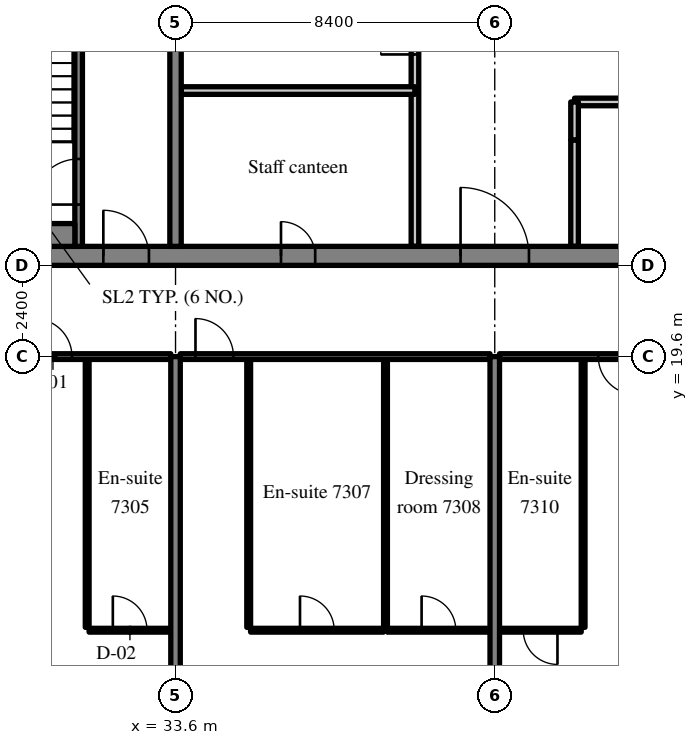
"""IFC4 building model, lengths in metres.
Left out: names, types, materials, properties, quantities, classifications, styles, units other than length and angle.
Written with IfcOpenShell. Run it as: python <this file> out.ifc"""

import sys

from ifc_helpers import new_model, si_unit, direction, frame, frame_2d, origin, place, context, subcontext, project, spatial, rectangle, extrude, source, transform, mapped, element, fill, save


model = new_model("IFC4")
c1 = context("Model", 3, precision=1e-05, world=origin(), true_north=direction((0.0, 1.0)))
c2 = subcontext(c1, "Body", "Model", "MODEL_VIEW")
j1 = project(units=[si_unit("LENGTHUNIT", "METRE"), si_unit("PLANEANGLEUNIT", "RADIAN")], contexts=[c1])
p1 = place(None, origin())
s1 = spatial("IfcSite", under=j1, at=p1, CompositionType="ELEMENT")
p2 = place(p1, origin())
s2 = spatial("IfcBuilding", under=s1, at=p2, CompositionType="ELEMENT")
p3 = place(p2, frame((0.0, 0.0, 305.7)))
s3 = spatial("IfcBuildingStorey", under=s2, at=p3, CompositionType="ELEMENT", Elevation=305.7)
m1 = source(origin(), c2, "Body", "SweptSolid", [
    extrude(rectangle(XDim=50.4, YDim=0.5, at=frame_2d((25.2, 0.0))), origin(), (0.0, 0.0, 1.0), 3.72),
])
p4 = place(p3, frame((25.2, 22.25, 0.0), z_axis=(0.0, 0.0, 1.0), x_axis=(1.0, 0.0, 0.0)))
e1 = element("IfcWall", 1, at=p4, inside=s3, PredefinedType="SHEAR", context=c2, shape_type="MappedRepresentation", body=[
    mapped(m1, transform((0.0, 0.0, 0.0), scale=1.0)),
])
m2 = source(origin(), c2, "Body", "SweptSolid", [
    extrude(rectangle(XDim=1.8, YDim=2.1, at=frame_2d((0.9, 1.05))), frame((0.0, 0.26, 0.0), z_axis=(0.0, -1.0, 0.0), x_axis=(1.0, 0.0, 0.0)), (0.0, 0.0, 1.0), 0.52),
])
p5 = place(p4, frame((15.9, 0.0, 0.0)))
e2 = element("IfcOpeningElement", 2, at=p5, cuts=e1, PredefinedType="OPENING", context=c2, shape_type="MappedRepresentation", body=[
    mapped(m2, transform((0.0, 0.0, 0.0), scale=1.0)),
])
m3 = source(origin(), c2, "Body", "SweptSolid", [
    extrude(rectangle(XDim=0.9, YDim=2.1, at=frame_2d((0.45, 1.05))), frame((0.0, 0.26, 0.0), z_axis=(0.0, -1.0, 0.0), x_axis=(1.0, 0.0, 0.0)), (0.0, 0.0, 1.0), 0.52),
])
p6 = place(p4, frame((11.175, 0.0, 0.0)))
e3 = element("IfcOpeningElement", 3, at=p6, cuts=e1, PredefinedType="OPENING", context=c2, shape_type="MappedRepresentation", body=[
    mapped(m3, transform((0.0, 0.0, 0.0), scale=1.0)),
])
p7 = place(p4, frame((21.525, 0.0, 0.0)))
e4 = element("IfcOpeningElement", 4, at=p7, cuts=e1, PredefinedType="OPENING", context=c2, shape_type="MappedRepresentation", body=[
    mapped(m3, transform((0.0, 0.0, 0.0), scale=1.0)),
])
p8 = place(p4, frame((32.7, 0.0, 0.0)))
e5 = element("IfcOpeningElement", 5, at=p8, cuts=e1, PredefinedType="OPENING", context=c2, shape_type="MappedRepresentation", body=[
    mapped(m2, transform((0.0, 0.0, 0.0), scale=1.0)),
])
m4 = source(origin(), c2, "Body", "SweptSolid", [
    extrude(rectangle(XDim=1.2, YDim=2.1, at=frame_2d((0.6, 1.05))), frame((0.0, 0.26, 0.0), z_axis=(0.0, -1.0, 0.0), x_axis=(1.0, 0.0, 0.0)), (0.0, 0.0, 1.0), 0.52),
])
p9 = place(p4, frame((6.5, 0.0, 0.0)))
e6 = element("IfcOpeningElement", 6, at=p9, cuts=e1, PredefinedType="OPENING", context=c2, shape_type="MappedRepresentation", body=[
    mapped(m4, transform((0.0, 0.0, 0.0), scale=1.0)),
])
p10 = place(p4, frame((47.975, 0.0, 0.0)))
e7 = element("IfcOpeningElement", 7, at=p10, cuts=e1, PredefinedType="OPENING", context=c2, shape_type="MappedRepresentation", body=[
    mapped(m4, transform((0.0, 0.0, 0.0), scale=1.0)),
])
m5 = source(origin(), c2, "Body", "SweptSolid", [
    extrude(rectangle(XDim=19.0, YDim=0.3, at=frame_2d((9.5, 0.0))), origin(), (0.0, 0.0, 1.0), 3.72),
])
p11 = place(p3, frame((33.6, 22.5, 0.0), z_axis=(0.0, 0.0, 1.0), x_axis=(0.0, 1.0, 0.0)))
e8 = element("IfcWall", 8, at=p11, inside=s3, PredefinedType="SHEAR", context=c2, shape_type="MappedRepresentation", body=[
    mapped(m5, transform((0.0, 0.0, 0.0), scale=1.0)),
])
m6 = source(origin(), c2, "Body", "SweptSolid", [
    extrude(rectangle(XDim=1.1, YDim=2.1, at=frame_2d((0.55, 1.05))), frame((0.0, 0.16, 0.0), z_axis=(0.0, -1.0, 0.0), x_axis=(1.0, 0.0, 0.0)), (0.0, 0.0, 1.0), 0.32),
])
p12 = place(p11, frame((12.95, 0.0, 0.0)))
e9 = element("IfcOpeningElement", 9, at=p12, cuts=e8, PredefinedType="OPENING", context=c2, shape_type="MappedRepresentation", body=[
    mapped(m6, transform((0.0, 0.0, 0.0), scale=1.0)),
])
m7 = source(origin(), c2, "Body", "SweptSolid", [
    extrude(rectangle(XDim=14.1, YDim=0.25, at=frame_2d((7.05, 0.0))), origin(), (0.0, 0.0, 1.0), 3.72),
])
for number, where, z_axis, x_axis in (
    (10, (33.6, 5.5, 0.0), (0.0, 0.0, 1.0), (0.0, 1.0, 0.0)),
    (11, (42.0, 5.5, 0.0), (0.0, 0.0, 1.0), (0.0, 1.0, 0.0)),
):
    element("IfcWall", number, at=place(p3, frame(where, z_axis=z_axis, x_axis=x_axis)), inside=s3, PredefinedType="SHEAR", context=c2, shape_type="MappedRepresentation", body=[
        mapped(m7, transform((0.0, 0.0, 0.0), scale=1.0)),
    ])
m8 = source(origin(), c2, "Body", "SweptSolid", [
    extrude(rectangle(XDim=8.95, YDim=0.2, at=frame_2d((4.475, 0.0))), origin(), (0.0, 0.0, 1.0), 3.72),
])
p13 = place(p3, frame((39.9, 22.5, 0.0), z_axis=(0.0, 0.0, 1.0), x_axis=(0.0, 1.0, 0.0)))
e12 = element("IfcWall", 12, at=p13, inside=s3, PredefinedType="PARTITIONING", context=c2, shape_type="MappedRepresentation", body=[
    mapped(m8, transform((0.0, 0.0, 0.0), scale=1.0)),
])
m9 = source(origin(), c2, "Body", "SweptSolid", [
    extrude(rectangle(XDim=0.9, YDim=2.1, at=frame_2d((0.45, 1.05))), frame((0.0, 0.11, 0.0), z_axis=(0.0, -1.0, 0.0), x_axis=(1.0, 0.0, 0.0)), (0.0, 0.0, 1.0), 0.22),
])
p14 = place(p13, frame((5.05, 0.0, 0.0)))
e13 = element("IfcOpeningElement", 13, at=p14, cuts=e12, PredefinedType="OPENING", context=c2, shape_type="MappedRepresentation", body=[
    mapped(m9, transform((0.0, 0.0, 0.0), scale=1.0)),
])
m10 = source(origin(), c2, "Body", "SweptSolid", [
    extrude(rectangle(XDim=2.8, YDim=0.2, at=frame_2d((1.4, 0.0))), origin(), (0.0, 0.0, 1.0), 3.72),
])
p15 = place(p3, frame((44.1, 22.5, 0.0), z_axis=(0.0, 0.0, 1.0), x_axis=(0.0, 1.0, 0.0)))
e14 = element("IfcWall", 14, at=p15, inside=s3, PredefinedType="PARTITIONING", context=c2, shape_type="MappedRepresentation", body=[
    mapped(m10, transform((0.0, 0.0, 0.0), scale=1.0)),
])
m11 = source(origin(), c2, "Body", "SweptSolid", [
    extrude(rectangle(XDim=6.15, YDim=0.2, at=frame_2d((3.075, 0.0))), origin(), (0.0, 0.0, 1.0), 3.72),
])
for number, where, z_axis, x_axis in (
    (15, (33.75, 26.6, 0.0), (0.0, 0.0, 1.0), (1.0, 0.0, 0.0)),
    (16, (44.1, 26.3, 0.0), (0.0, 0.0, 1.0), (1.0, 0.0, 0.0)),
):
    element("IfcWall", number, at=place(p3, frame(where, z_axis=z_axis, x_axis=x_axis)), inside=s3, PredefinedType="PARTITIONING", context=c2, shape_type="MappedRepresentation", body=[
        mapped(m11, transform((0.0, 0.0, 0.0), scale=1.0)),
    ])
m12 = source(origin(), c2, "Body", "SweptSolid", [
    extrude(rectangle(XDim=1.0, YDim=0.2, at=frame_2d((0.5, 0.0))), origin(), (0.0, 0.0, 1.0), 3.72),
])
p16 = place(p3, frame((44.1, 25.3, 0.0), z_axis=(0.0, 0.0, 1.0), x_axis=(0.0, 1.0, 0.0)))
e17 = element("IfcWall", 17, at=p16, inside=s3, PredefinedType="PARTITIONING", context=c2, shape_type="MappedRepresentation", body=[
    mapped(m12, transform((0.0, 0.0, 0.0), scale=1.0)),
])
m13 = source(origin(), c2, "Body", "SweptSolid", [
    extrude(rectangle(XDim=8.95, YDim=0.2, at=frame_2d((4.475, 0.0))), origin(), (0.0, 0.0, 1.0), 3.72),
])
p17 = place(p3, frame((31.05, 22.5, 0.0), z_axis=(0.0, 0.0, 1.0), x_axis=(0.0, 1.0, 0.0)))
e18 = element("IfcWall", 18, at=p17, inside=s3, PredefinedType="SOLIDWALL", context=c2, shape_type="MappedRepresentation", body=[
    mapped(m13, transform((0.0, 0.0, 0.0), scale=1.0)),
])
m14 = source(origin(), c2, "Body", "SweptSolid", [
    extrude(rectangle(XDim=1.2, YDim=2.1, at=frame_2d((0.6, 1.05))), frame((0.0, 0.11, 0.0), z_axis=(0.0, -1.0, 0.0), x_axis=(1.0, 0.0, 0.0)), (0.0, 0.0, 1.0), 0.22),
])
p18 = place(p17, frame((1.1, 0.0, 0.0)))
e19 = element("IfcOpeningElement", 19, at=p18, cuts=e18, PredefinedType="OPENING", context=c2, shape_type="MappedRepresentation", body=[
    mapped(m14, transform((0.0, 0.0, 0.0), scale=1.0)),
])
m15 = source(origin(), c2, "Body", "SweptSolid", [
    extrude(rectangle(XDim=5.25, YDim=0.6, at=frame_2d((2.625, 0.0))), origin(), (0.0, 0.0, 1.0), 3.72),
])
p19 = place(p3, frame((25.7, 22.8, 0.0), z_axis=(0.0, 0.0, 1.0), x_axis=(1.0, 0.0, 0.0)))
e20 = element("IfcWall", 20, at=p19, inside=s3, PredefinedType="SOLIDWALL", context=c2, shape_type="MappedRepresentation", body=[
    mapped(m15, transform((0.0, 0.0, 0.0), scale=1.0)),
])
m16 = source(origin(), c2, "Body", "SweptSolid", [
    extrude(rectangle(XDim=7.05, YDim=0.1, at=frame_2d((3.525, 0.0))), origin(), (0.0, 0.0, 1.0), 3.72),
])
p20 = place(p3, frame((31.275, 12.475, 0.0), z_axis=(0.0, 0.0, 1.0), x_axis=(0.0, 1.0, 0.0)))
e21 = element("IfcWall", 21, at=p20, inside=s3, PredefinedType="PARTITIONING", context=c2, shape_type="MappedRepresentation", body=[
    mapped(m16, transform((0.0, 0.0, 0.0), scale=1.0)),
])
m17 = source(origin(), c2, "Body", "SweptSolid", [
    extrude(rectangle(XDim=2.15, YDim=0.1, at=frame_2d((1.075, 0.0))), origin(), (0.0, 0.0, 1.0), 3.72),
])
p21 = place(p3, frame((31.325, 12.4, 0.0), z_axis=(0.0, 0.0, 1.0), x_axis=(1.0, 0.0, 0.0)))
e22 = element("IfcWall", 22, at=p21, inside=s3, PredefinedType="PARTITIONING", context=c2, shape_type="MappedRepresentation", body=[
    mapped(m17, transform((0.0, 0.0, 0.0), scale=1.0)),
])
m18 = source(origin(), c2, "Body", "SweptSolid", [
    extrude(rectangle(XDim=0.9, YDim=2.1, at=frame_2d((0.45, 1.05))), frame((0.0, 0.06, 0.0), z_axis=(0.0, -1.0, 0.0), x_axis=(1.0, 0.0, 0.0)), (0.0, 0.0, 1.0), 0.12),
])
p22 = place(p21, frame((0.625, 0.0, 0.0)))
e23 = element("IfcOpeningElement", 23, at=p22, cuts=e22, PredefinedType="OPENING", context=c2, shape_type="MappedRepresentation", body=[
    mapped(m18, transform((0.0, 0.0, 0.0), scale=1.0)),
])
m19 = source(origin(), c2, "Body", "SweptSolid", [
    extrude(rectangle(XDim=4.0, YDim=0.15, at=frame_2d((2.0, 0.0))), origin(), (0.0, 0.0, 1.0), 3.02),
])
p23 = place(p3, frame((29.475, 19.6, 0.0), z_axis=(0.0, 0.0, 1.0), x_axis=(1.0, 0.0, 0.0)))
e24 = element("IfcWall", 24, at=p23, inside=s3, PredefinedType="PARTITIONING", context=c2, shape_type="MappedRepresentation", body=[
    mapped(m19, transform((0.0, 0.0, 0.0), scale=1.0)),
])
m20 = source(origin(), c2, "Body", "SweptSolid", [
    extrude(rectangle(XDim=1.0, YDim=2.1, at=frame_2d((0.5, 1.05))), frame((0.0, 0.085, 0.0), z_axis=(0.0, -1.0, 0.0), x_axis=(1.0, 0.0, 0.0)), (0.0, 0.0, 1.0), 0.17),
])
p24 = place(p23, frame((0.4, 0.0, 0.0)))
e25 = element("IfcOpeningElement", 25, at=p24, cuts=e24, PredefinedType="OPENING", context=c2, shape_type="MappedRepresentation", body=[
    mapped(m20, transform((0.0, 0.0, 0.0), scale=1.0)),
])
for number, where, z_axis, x_axis in (
    (26, (35.525, 12.475, 0.0), (0.0, 0.0, 1.0), (0.0, 1.0, 0.0)),
    (27, (39.125, 12.475, 0.0), (0.0, 0.0, 1.0), (0.0, 1.0, 0.0)),
):
    element("IfcWall", number, at=place(p3, frame(where, z_axis=z_axis, x_axis=x_axis)), inside=s3, PredefinedType="PARTITIONING", context=c2, shape_type="MappedRepresentation", body=[
        mapped(m16, transform((0.0, 0.0, 0.0), scale=1.0)),
    ])
m21 = source(origin(), c2, "Body", "SweptSolid", [
    extrude(rectangle(XDim=3.5, YDim=0.1, at=frame_2d((1.75, 0.0))), origin(), (0.0, 0.0, 1.0), 3.72),
])
p25 = place(p3, frame((35.575, 12.4, 0.0), z_axis=(0.0, 0.0, 1.0), x_axis=(1.0, 0.0, 0.0)))
e28 = element("IfcWall", 28, at=p25, inside=s3, PredefinedType="PARTITIONING", context=c2, shape_type="MappedRepresentation", body=[
    mapped(m21, transform((0.0, 0.0, 0.0), scale=1.0)),
])
p26 = place(p25, frame((1.3, 0.0, 0.0)))
e29 = element("IfcOpeningElement", 29, at=p26, cuts=e28, PredefinedType="OPENING", context=c2, shape_type="MappedRepresentation", body=[
    mapped(m18, transform((0.0, 0.0, 0.0), scale=1.0)),
])
m22 = source(origin(), c2, "Body", "SweptSolid", [
    extrude(rectangle(XDim=2.7, YDim=0.1, at=frame_2d((1.35, 0.0))), origin(), (0.0, 0.0, 1.0), 3.72),
])
p27 = place(p3, frame((39.175, 12.4, 0.0), z_axis=(0.0, 0.0, 1.0), x_axis=(1.0, 0.0, 0.0)))
e30 = element("IfcWall", 30, at=p27, inside=s3, PredefinedType="PARTITIONING", context=c2, shape_type="MappedRepresentation", body=[
    mapped(m22, transform((0.0, 0.0, 0.0), scale=1.0)),
])
p28 = place(p27, frame((0.9, 0.0, 0.0)))
e31 = element("IfcOpeningElement", 31, at=p28, cuts=e30, PredefinedType="OPENING", context=c2, shape_type="MappedRepresentation", body=[
    mapped(m18, transform((0.0, 0.0, 0.0), scale=1.0)),
])
m23 = source(origin(), c2, "Body", "SweptSolid", [
    extrude(rectangle(XDim=8.15, YDim=0.15, at=frame_2d((4.075, 0.0))), origin(), (0.0, 0.0, 1.0), 3.02),
])
p29 = place(p3, frame((33.725, 19.6, 0.0), z_axis=(0.0, 0.0, 1.0), x_axis=(1.0, 0.0, 0.0)))
e32 = element("IfcWall", 32, at=p29, inside=s3, PredefinedType="PARTITIONING", context=c2, shape_type="MappedRepresentation", body=[
    mapped(m23, transform((0.0, 0.0, 0.0), scale=1.0)),
])
p30 = place(p29, frame((0.4, 0.0, 0.0)))
e33 = element("IfcOpeningElement", 33, at=p30, cuts=e32, PredefinedType="OPENING", context=c2, shape_type="MappedRepresentation", body=[
    mapped(m20, transform((0.0, 0.0, 0.0), scale=1.0)),
])
p31 = place(p3, frame((44.325, 12.475, 0.0), z_axis=(0.0, 0.0, 1.0), x_axis=(0.0, 1.0, 0.0)))
e34 = element("IfcWall", 34, at=p31, inside=s3, PredefinedType="PARTITIONING", context=c2, shape_type="MappedRepresentation", body=[
    mapped(m16, transform((0.0, 0.0, 0.0), scale=1.0)),
])
m24 = source(origin(), c2, "Body", "SweptSolid", [
    extrude(rectangle(XDim=2.15, YDim=0.1, at=frame_2d((1.075, 0.0))), origin(), (0.0, 0.0, 1.0), 3.72),
])
p32 = place(p3, frame((42.125, 12.4, 0.0), z_axis=(0.0, 0.0, 1.0), x_axis=(1.0, 0.0, 0.0)))
e35 = element("IfcWall", 35, at=p32, inside=s3, PredefinedType="PARTITIONING", context=c2, shape_type="MappedRepresentation", body=[
    mapped(m24, transform((0.0, 0.0, 0.0), scale=1.0)),
])
p33 = place(p32, frame((0.625, 0.0, 0.0)))
e36 = element("IfcOpeningElement", 36, at=p33, cuts=e35, PredefinedType="OPENING", context=c2, shape_type="MappedRepresentation", body=[
    mapped(m18, transform((0.0, 0.0, 0.0), scale=1.0)),
])
p34 = place(p3, frame((42.125, 19.6, 0.0), z_axis=(0.0, 0.0, 1.0), x_axis=(1.0, 0.0, 0.0)))
e37 = element("IfcWall", 37, at=p34, inside=s3, PredefinedType="PARTITIONING", context=c2, shape_type="MappedRepresentation", body=[
    mapped(m19, transform((0.0, 0.0, 0.0), scale=1.0)),
])
p35 = place(p34, frame((2.6, 0.0, 0.0)))
e38 = element("IfcOpeningElement", 38, at=p35, cuts=e37, PredefinedType="OPENING", context=c2, shape_type="MappedRepresentation", body=[
    mapped(m20, transform((0.0, 0.0, 0.0), scale=1.0)),
])
m25 = source(origin(), c2, "Body", "SweptSolid", [
    extrude(rectangle(XDim=1.8, YDim=2.1, at=frame_2d((0.9, 1.05))), frame((0.0, 0.175, 0.0), z_axis=(0.0, -1.0, 0.0), x_axis=(1.0, 0.0, 0.0)), (0.0, 0.0, 1.0), 0.05),
])
p36 = place(p5, origin())
e39 = element("IfcDoor", 39, at=p36, inside=s3, OperationType="DOUBLE_DOOR_SINGLE_SWING", PredefinedType="DOOR", context=c2, shape_type="MappedRepresentation", body=[
    mapped(m25, transform((0.0, 0.0, 0.0), scale=1.0)),
])
fill(e2, e39)
m26 = source(origin(), c2, "Body", "SweptSolid", [
    extrude(rectangle(XDim=0.9, YDim=2.1, at=frame_2d((0.45, 1.05))), frame((0.0, 0.175, 0.0), z_axis=(0.0, -1.0, 0.0), x_axis=(1.0, 0.0, 0.0)), (0.0, 0.0, 1.0), 0.05),
])
p37 = place(p6, origin())
e40 = element("IfcDoor", 40, at=p37, inside=s3, OperationType="SINGLE_SWING_LEFT", PredefinedType="DOOR", context=c2, shape_type="MappedRepresentation", body=[
    mapped(m26, transform((0.0, 0.0, 0.0), scale=1.0)),
])
fill(e3, e40)
m27 = source(origin(), c2, "Body", "SweptSolid", [
    extrude(rectangle(XDim=0.9, YDim=2.1, at=frame_2d((0.45, 1.05))), frame((0.0, 0.025, 0.0), z_axis=(0.0, -1.0, 0.0), x_axis=(1.0, 0.0, 0.0)), (0.0, 0.0, 1.0), 0.05),
])
p38 = place(p14, origin())
e41 = element("IfcDoor", 41, at=p38, inside=s3, OperationType="SINGLE_SWING_LEFT", PredefinedType="DOOR", context=c2, shape_type="MappedRepresentation", body=[
    mapped(m27, transform((0.0, 0.0, 0.0), scale=1.0)),
])
fill(e13, e41)
m28 = source(origin(), c2, "Body", "SweptSolid", [
    extrude(rectangle(XDim=1.2, YDim=2.1, at=frame_2d((0.6, 1.05))), frame((0.0, 0.025, 0.0), z_axis=(0.0, -1.0, 0.0), x_axis=(1.0, 0.0, 0.0)), (0.0, 0.0, 1.0), 0.05),
])
p39 = place(p18, origin())
e42 = element("IfcDoor", 42, at=p39, inside=s3, OperationType="SINGLE_SWING_LEFT", PredefinedType="DOOR", context=c2, shape_type="MappedRepresentation", body=[
    mapped(m28, transform((0.0, 0.0, 0.0), scale=1.0)),
])
fill(e19, e42)
m29 = source(origin(), c2, "Body", "SweptSolid", [
    extrude(rectangle(XDim=1.2, YDim=2.1, at=frame_2d((0.6, 1.05))), frame((0.0, 0.175, 0.0), z_axis=(0.0, -1.0, 0.0), x_axis=(1.0, 0.0, 0.0)), (0.0, 0.0, 1.0), 0.05),
])
p40 = place(p9, origin())
e43 = element("IfcDoor", 43, at=p40, inside=s3, OperationType="SINGLE_SWING_LEFT", PredefinedType="DOOR", context=c2, shape_type="MappedRepresentation", body=[
    mapped(m29, transform((0.0, 0.0, 0.0), scale=1.0)),
])
fill(e6, e43)
p41 = place(p22, origin())
e44 = element("IfcDoor", 44, at=p41, inside=s3, OperationType="SINGLE_SWING_LEFT", PredefinedType="DOOR", context=c2, shape_type="MappedRepresentation", body=[
    mapped(m27, transform((0.0, 0.0, 0.0), scale=1.0)),
])
fill(e23, e44)
m30 = source(origin(), c2, "Body", "SweptSolid", [
    extrude(rectangle(XDim=1.0, YDim=2.1, at=frame_2d((0.5, 1.05))), frame((0.0, 0.025, 0.0), z_axis=(0.0, -1.0, 0.0), x_axis=(1.0, 0.0, 0.0)), (0.0, 0.0, 1.0), 0.05),
])
p42 = place(p24, origin())
e45 = element("IfcDoor", 45, at=p42, inside=s3, OperationType="SINGLE_SWING_LEFT", PredefinedType="DOOR", context=c2, shape_type="MappedRepresentation", body=[
    mapped(m30, transform((0.0, 0.0, 0.0), scale=1.0)),
])
fill(e25, e45)
p43 = place(p26, origin())
e46 = element("IfcDoor", 46, at=p43, inside=s3, OperationType="SINGLE_SWING_LEFT", PredefinedType="DOOR", context=c2, shape_type="MappedRepresentation", body=[
    mapped(m27, transform((0.0, 0.0, 0.0), scale=1.0)),
])
fill(e29, e46)
p44 = place(p28, origin())
e47 = element("IfcDoor", 47, at=p44, inside=s3, OperationType="SINGLE_SWING_LEFT", PredefinedType="DOOR", context=c2, shape_type="MappedRepresentation", body=[
    mapped(m27, transform((0.0, 0.0, 0.0), scale=1.0)),
])
fill(e31, e47)
p45 = place(p30, origin())
e48 = element("IfcDoor", 48, at=p45, inside=s3, OperationType="SINGLE_SWING_LEFT", PredefinedType="DOOR", context=c2, shape_type="MappedRepresentation", body=[
    mapped(m30, transform((0.0, 0.0, 0.0), scale=1.0)),
])
fill(e33, e48)
p46 = place(p33, origin())
e49 = element("IfcDoor", 49, at=p46, inside=s3, OperationType="SINGLE_SWING_RIGHT", PredefinedType="DOOR", context=c2, shape_type="MappedRepresentation", body=[
    mapped(m27, transform((0.0, 0.0, 0.0), scale=1.0)),
])
fill(e36, e49)
p47 = place(p35, origin())
e50 = element("IfcDoor", 50, at=p47, inside=s3, OperationType="SINGLE_SWING_RIGHT", PredefinedType="DOOR", context=c2, shape_type="MappedRepresentation", body=[
    mapped(m30, transform((0.0, 0.0, 0.0), scale=1.0)),
])
fill(e38, e50)
save(model, sys.argv[1])
